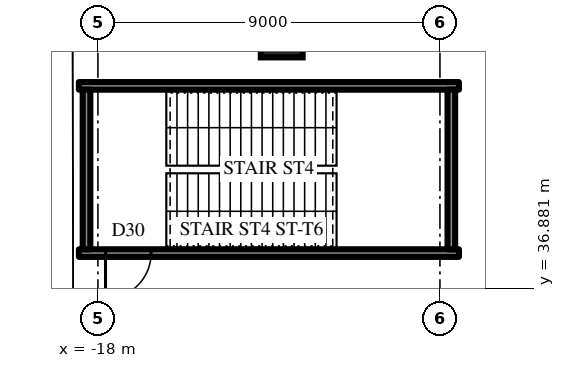
"""IFC4 building model, lengths in metres.
Left out: names, types, materials, properties, quantities, classifications, styles, units other than length and angle.
Written with IfcOpenShell. Run it as: python <this file> out.ifc"""

import sys

from ifc_helpers import new_model, si_unit, direction, frame, frame_2d, origin, origin_2d, place, context, subcontext, project, spatial, rectangle, extrude, element, fill, save


model = new_model("IFC4")
c1 = context("Model", 3, precision=1e-05, world=origin(), true_north=direction((0.0, 1.0)))
c2 = subcontext(c1, "Body", "Model", "MODEL_VIEW")
j1 = project(units=[si_unit("LENGTHUNIT", "METRE"), si_unit("PLANEANGLEUNIT", "RADIAN")], contexts=[c1])
p1 = place(None, origin())
s1 = spatial("IfcSite", under=j1, at=p1, CompositionType="ELEMENT")
p2 = place(p1, origin())
s2 = spatial("IfcBuilding", under=s1, at=p2, CompositionType="ELEMENT")
p3 = place(p2, frame((0.0, 0.0, 7.0)))
s3 = spatial("IfcBuildingStorey", under=s2, at=p3, CompositionType="ELEMENT", Elevation=7.0)
p4 = place(p3, frame((-18.5, 37.8, 0.0), z_axis=(0.0, 0.0, 1.0), x_axis=(1.0, 0.0, 0.0)))
e1 = element("IfcWall", 1, at=p4, inside=s3, PredefinedType="SHEAR", context=c2, shape_type="SweptSolid", body=[
    extrude(rectangle(XDim=10.0, YDim=0.2, at=frame_2d((5.0, 0.0))), origin(), (0.0, 0.0, 1.0), 6.0),
])
p5 = place(p4, frame((0.7, 0.0, 0.0)))
e2 = element("IfcOpeningElement", 2, at=p5, cuts=e1, PredefinedType="OPENING", context=c2, shape_type="SweptSolid", body=[
    extrude(rectangle(XDim=1.2, YDim=2.2, at=frame_2d((0.6, 1.1))), frame((0.0, 0.11, 0.0), z_axis=(0.0, -1.0, 0.0), x_axis=(1.0, 0.0, 0.0)), (0.0, 0.0, 1.0), 0.22),
])
p6 = place(p3, frame((-8.5, 42.2, 0.0), z_axis=(0.0, 0.0, 1.0), x_axis=(-1.0, 0.0, 0.0)))
e3 = element("IfcWall", 3, at=p6, inside=s3, PredefinedType="SHEAR", context=c2, shape_type="SweptSolid", body=[
    extrude(rectangle(XDim=10.0, YDim=0.2, at=frame_2d((5.0, 0.0))), origin(), (0.0, 0.0, 1.0), 6.0),
])
for number, where, z_axis, x_axis in (
    (4, (-18.3, 42.1, 0.0), (0.0, 0.0, 1.0), (0.0, -1.0, 0.0)),
    (5, (-8.7, 37.9, 0.0), (0.0, 0.0, 1.0), (0.0, 1.0, 0.0)),
):
    element("IfcWall", number, at=place(p3, frame(where, z_axis=z_axis, x_axis=x_axis)), inside=s3, PredefinedType="SHEAR", context=c2, shape_type="SweptSolid", body=[
        extrude(rectangle(XDim=4.2, YDim=0.2, at=frame_2d((2.1, 0.0))), origin(), (0.0, 0.0, 1.0), 6.0),
    ])
p7 = place(p3, frame((-13.164, 43.5, 0.0), z_axis=(0.0, 0.0, 1.0), x_axis=(-1.0, 0.0, 0.0)))
e6 = element("IfcColumn", 6, at=p7, inside=s3, PredefinedType="COLUMN", context=c2, shape_type="SweptSolid", body=[
    extrude(rectangle(XDim=1.1, YDim=1.1, at=origin_2d()), origin(), (0.0, 0.0, 1.0), 6.0),
])
p8 = place(p5, frame((1.2, 0.0, 0.0), z_axis=(0.0, 0.0, 1.0), x_axis=(-1.0, 0.0, 0.0)))
e7 = element("IfcDoor", 7, at=p8, inside=s3, OperationType="SINGLE_SWING_LEFT", PredefinedType="DOOR", context=c2, shape_type="SweptSolid", body=[
    extrude(rectangle(XDim=1.2, YDim=2.2, at=frame_2d((0.6, 1.1))), frame((0.0, 0.025, 0.0), z_axis=(0.0, -1.0, 0.0), x_axis=(1.0, 0.0, 0.0)), (0.0, 0.0, 1.0), 0.05),
])
fill(e2, e7)
save(model, sys.argv[1])
